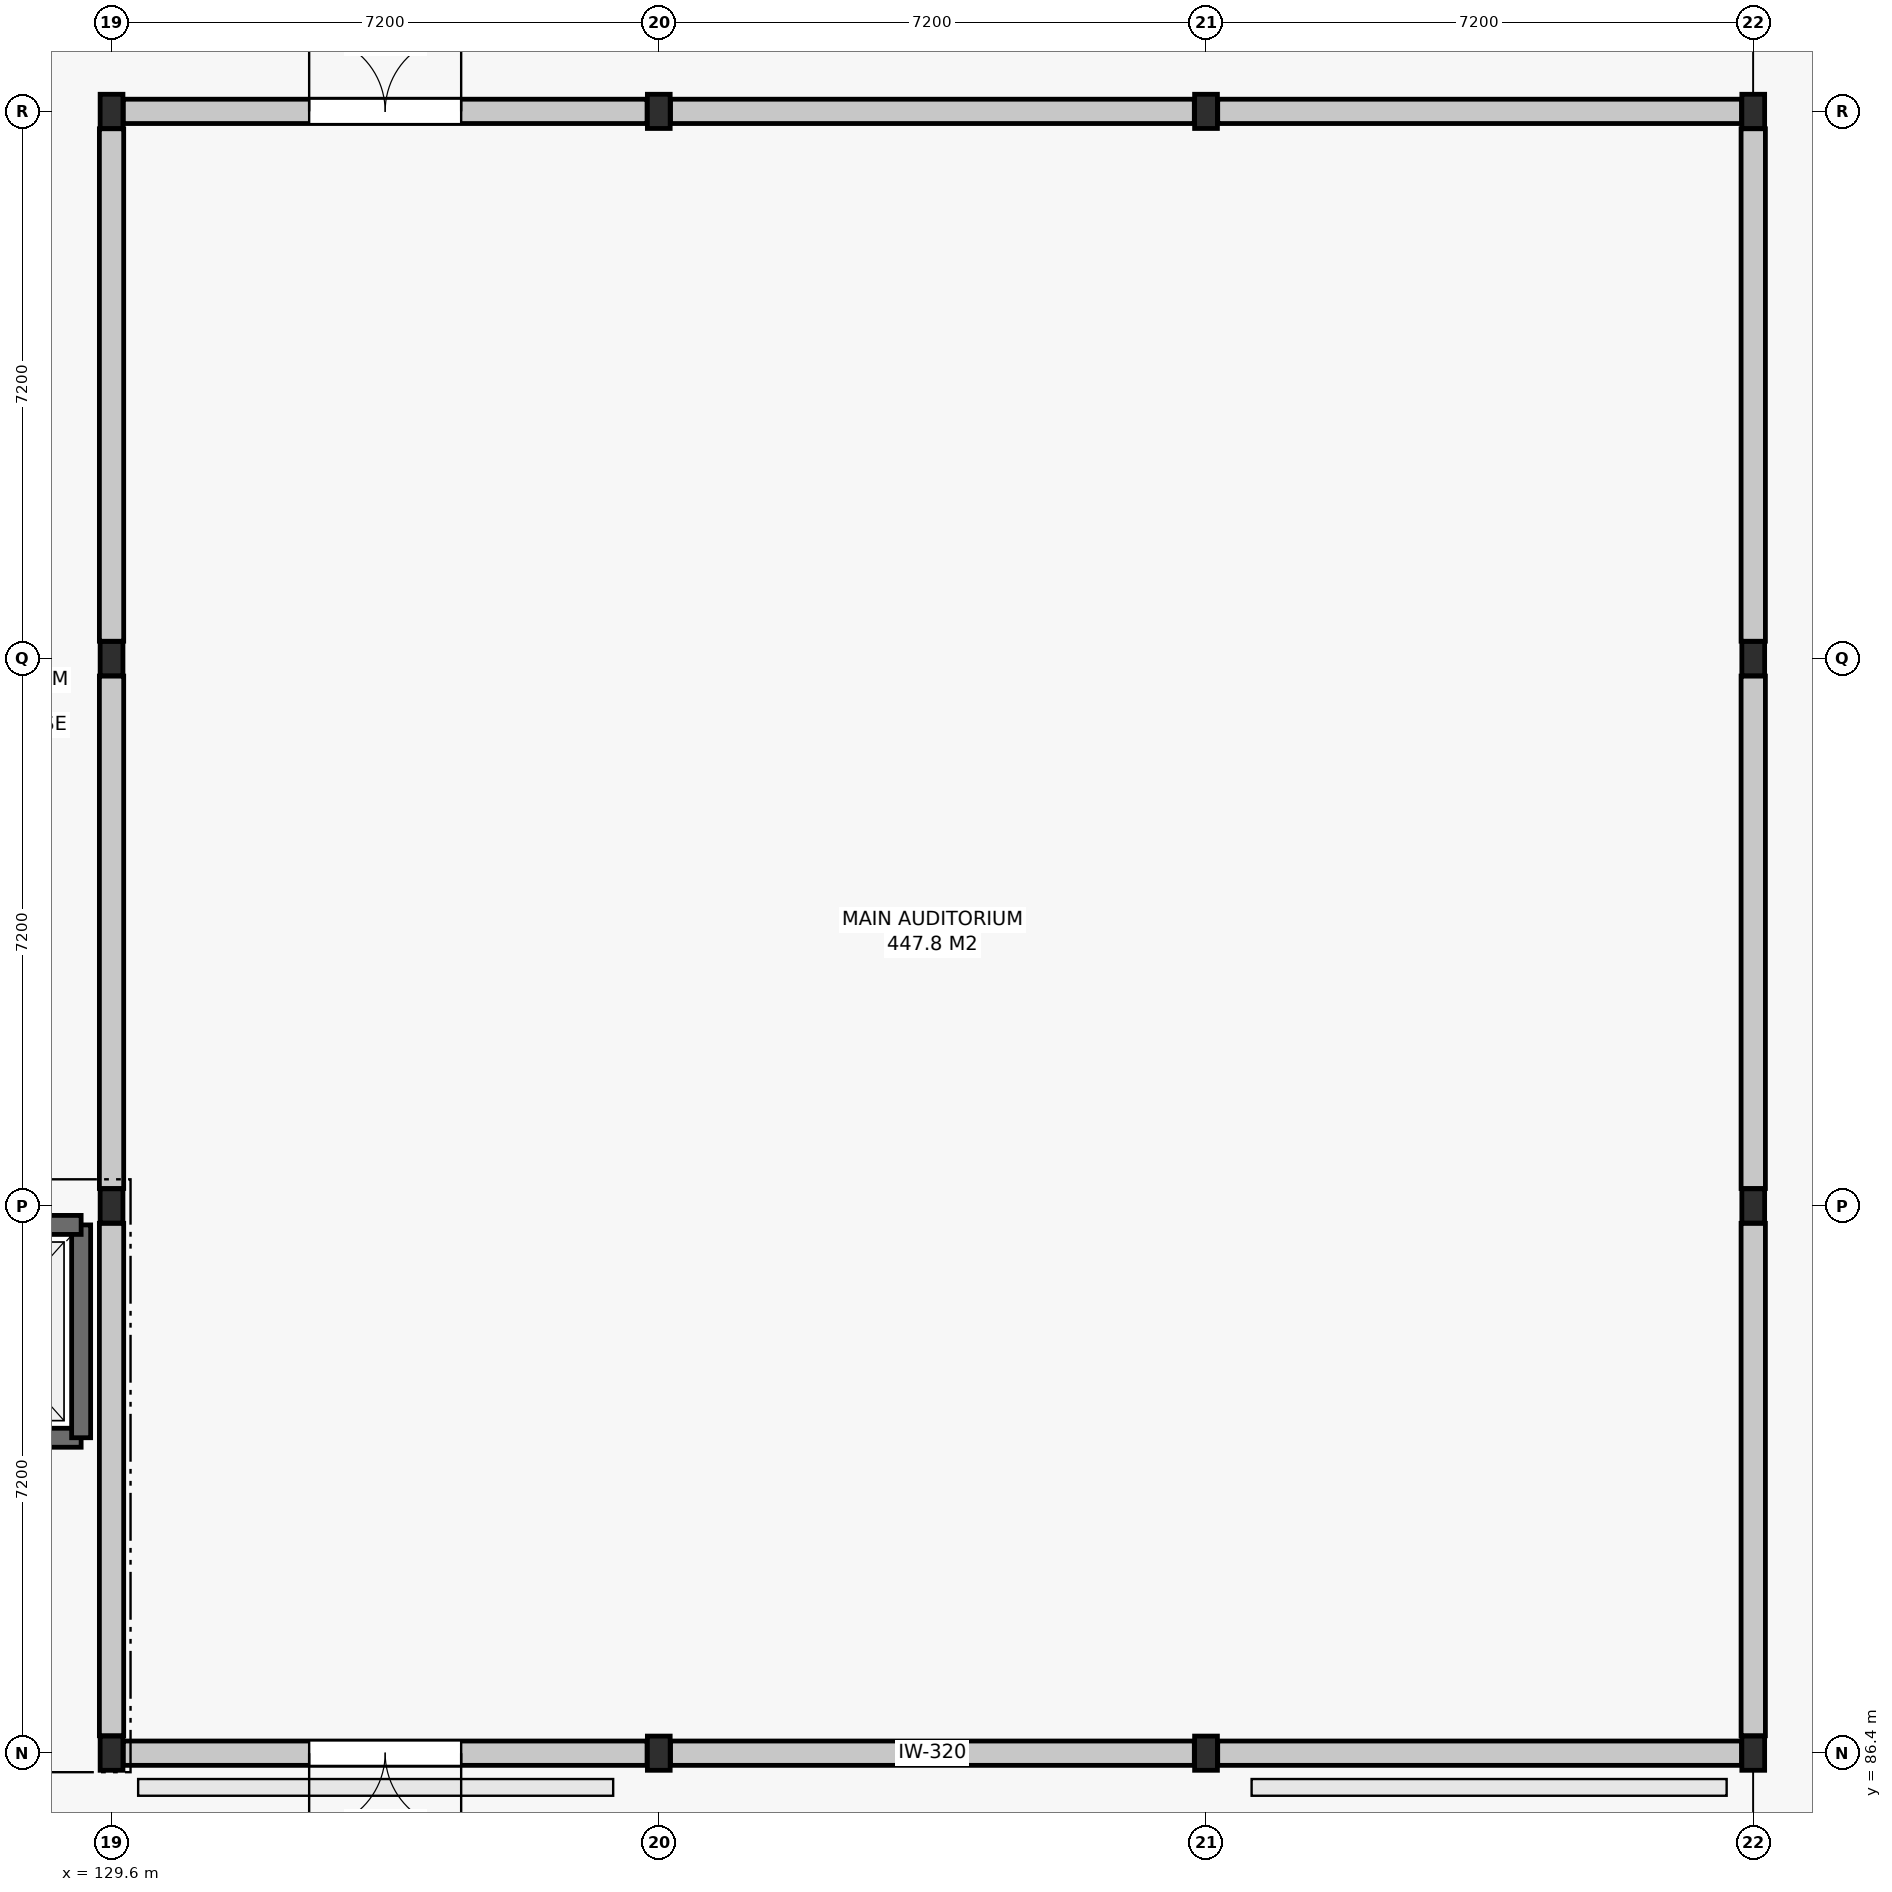
"""IFC4 building model, lengths in metres.
Left out: names, types, materials, properties, quantities, classifications, styles, units other than length and angle.
Written with IfcOpenShell. Run it as: python <this file> out.ifc"""

import sys

from ifc_helpers import new_model, si_unit, direction, frame, frame_2d, origin, origin_2d, place, context, subcontext, project, spatial, rectangle, i_section, extrude, element, fill, save


model = new_model("IFC4")
c1 = context("Model", 3, precision=1e-05, world=origin(), true_north=direction((0.0, 1.0)))
c2 = subcontext(c1, "Body", "Model", "MODEL_VIEW")
j1 = project(units=[si_unit("LENGTHUNIT", "METRE"), si_unit("PLANEANGLEUNIT", "RADIAN")], contexts=[c1])
p1 = place(None, origin())
s1 = spatial("IfcSite", under=j1, at=p1, CompositionType="ELEMENT")
p2 = place(p1, origin())
s2 = spatial("IfcBuilding", under=s1, at=p2, CompositionType="ELEMENT")
p3 = place(p2, origin())
s3 = spatial("IfcBuildingStorey", under=s2, at=p3, CompositionType="ELEMENT", Elevation=0.0)
for number, where, z_axis, x_axis in (
    (1, (129.6, 86.4, 0.0), (0.0, 0.0, 1.0), (1.0, 0.0, 0.0)),
    (2, (129.6, 93.6, 0.0), (0.0, 0.0, 1.0), (1.0, 0.0, 0.0)),
    (3, (129.6, 100.8, 0.0), (0.0, 0.0, 1.0), (1.0, 0.0, 0.0)),
    (4, (129.6, 108.0, 0.0), (0.0, 0.0, 1.0), (1.0, 0.0, 0.0)),
    (5, (136.8, 86.4, 0.0), (0.0, 0.0, 1.0), (1.0, 0.0, 0.0)),
    (6, (136.8, 108.0, 0.0), (0.0, 0.0, 1.0), (1.0, 0.0, 0.0)),
    (7, (144.0, 86.4, 0.0), (0.0, 0.0, 1.0), (1.0, 0.0, 0.0)),
    (8, (144.0, 108.0, 0.0), (0.0, 0.0, 1.0), (1.0, 0.0, 0.0)),
    (9, (151.2, 86.4, 0.0), (0.0, 0.0, 1.0), (1.0, 0.0, 0.0)),
    (10, (151.2, 93.6, 0.0), (0.0, 0.0, 1.0), (1.0, 0.0, 0.0)),
    (11, (151.2, 100.8, 0.0), (0.0, 0.0, 1.0), (1.0, 0.0, 0.0)),
    (12, (151.2, 108.0, 0.0), (0.0, 0.0, 1.0), (1.0, 0.0, 0.0)),
):
    element("IfcColumn", number, at=place(p3, frame(where, z_axis=z_axis, x_axis=x_axis)), inside=s3, PredefinedType="COLUMN", context=c2, shape_type="SweptSolid", body=[
        extrude(i_section(OverallWidth=0.3, OverallDepth=0.45, WebThickness=0.014, FlangeThickness=0.026, FilletRadius=0.027, at=origin_2d()), origin(), (0.0, 0.0, 1.0), 5.4),
    ])
p4 = place(p3, frame((126.65, 90.55, 0.0), z_axis=(0.0, 0.0, 1.0), x_axis=(1.0, 0.0, 0.0)))
e13 = element("IfcWall", 13, at=p4, inside=s3, PredefinedType="SHEAR", context=c2, shape_type="SweptSolid", body=[
    extrude(rectangle(XDim=2.55, YDim=0.25, at=frame_2d((1.275, 0.0))), origin(), (0.0, 0.0, 1.0), 5.12),
])
p5 = place(p4, frame((0.725, 0.0, 0.0)))
e14 = element("IfcOpeningElement", 14, at=p5, cuts=e13, PredefinedType="OPENING", context=c2, shape_type="SweptSolid", body=[
    extrude(rectangle(XDim=1.1, YDim=2.1, at=frame_2d((0.55, 1.05))), frame((0.0, 0.137, 0.0), z_axis=(0.0, -1.0, 0.0), x_axis=(1.0, 0.0, 0.0)), (0.0, 0.0, 1.0), 0.274),
])
p6 = place(p3, frame((129.2, 90.55, 0.0), z_axis=(0.0, 0.0, 1.0), x_axis=(0.0, 1.0, 0.0)))
e15 = element("IfcWall", 15, at=p6, inside=s3, PredefinedType="SHEAR", context=c2, shape_type="SweptSolid", body=[
    extrude(rectangle(XDim=2.8, YDim=0.25, at=frame_2d((1.4, 0.0))), origin(), (0.0, 0.0, 1.0), 5.12),
])
p7 = place(p3, frame((129.2, 93.35, 0.0), z_axis=(0.0, 0.0, 1.0), x_axis=(-1.0, 0.0, 0.0)))
e16 = element("IfcWall", 16, at=p7, inside=s3, PredefinedType="SHEAR", context=c2, shape_type="SweptSolid", body=[
    extrude(rectangle(XDim=2.55, YDim=0.25, at=frame_2d((1.275, 0.0))), origin(), (0.0, 0.0, 1.0), 5.12),
])
p8 = place(p3, frame((129.754, 86.4, 0.0), z_axis=(0.0, 0.0, 1.0), x_axis=(1.0, 0.0, 0.0)))
e17 = element("IfcWall", 17, at=p8, inside=s3, PredefinedType="SOLIDWALL", context=c2, shape_type="SweptSolid", body=[
    extrude(rectangle(XDim=6.892, YDim=0.32, at=frame_2d((3.446, 0.0))), origin(), (0.0, 0.0, 1.0), 5.105),
])
p9 = place(p8, frame((2.446, 0.0, 0.0)))
e18 = element("IfcOpeningElement", 18, at=p9, cuts=e17, PredefinedType="OPENING", context=c2, shape_type="SweptSolid", body=[
    extrude(rectangle(XDim=2.0, YDim=2.4, at=frame_2d((1.0, 1.2))), frame((0.0, 0.172, 0.0), z_axis=(0.0, -1.0, 0.0), x_axis=(1.0, 0.0, 0.0)), (0.0, 0.0, 1.0), 0.344),
])
for number, where, z_axis, x_axis in (
    (19, (136.954, 86.4, 0.0), (0.0, 0.0, 1.0), (1.0, 0.0, 0.0)),
    (20, (144.154, 86.4, 0.0), (0.0, 0.0, 1.0), (1.0, 0.0, 0.0)),
):
    element("IfcWall", number, at=place(p3, frame(where, z_axis=z_axis, x_axis=x_axis)), inside=s3, PredefinedType="SOLIDWALL", context=c2, shape_type="SweptSolid", body=[
        extrude(rectangle(XDim=6.892, YDim=0.32, at=frame_2d((3.446, 0.0))), origin(), (0.0, 0.0, 1.0), 5.105),
    ])
p10 = place(p3, frame((129.754, 108.0, 0.0), z_axis=(0.0, 0.0, 1.0), x_axis=(1.0, 0.0, 0.0)))
e21 = element("IfcWall", 21, at=p10, inside=s3, PredefinedType="SOLIDWALL", context=c2, shape_type="SweptSolid", body=[
    extrude(rectangle(XDim=6.892, YDim=0.32, at=frame_2d((3.446, 0.0))), origin(), (0.0, 0.0, 1.0), 5.105),
])
p11 = place(p10, frame((2.446, 0.0, 0.0)))
e22 = element("IfcOpeningElement", 22, at=p11, cuts=e21, PredefinedType="OPENING", context=c2, shape_type="SweptSolid", body=[
    extrude(rectangle(XDim=2.0, YDim=2.4, at=frame_2d((1.0, 1.2))), frame((0.0, 0.172, 0.0), z_axis=(0.0, -1.0, 0.0), x_axis=(1.0, 0.0, 0.0)), (0.0, 0.0, 1.0), 0.344),
])
for number, where, z_axis, x_axis in (
    (23, (136.954, 108.0, 0.0), (0.0, 0.0, 1.0), (1.0, 0.0, 0.0)),
    (24, (144.154, 108.0, 0.0), (0.0, 0.0, 1.0), (1.0, 0.0, 0.0)),
):
    element("IfcWall", number, at=place(p3, frame(where, z_axis=z_axis, x_axis=x_axis)), inside=s3, PredefinedType="SOLIDWALL", context=c2, shape_type="SweptSolid", body=[
        extrude(rectangle(XDim=6.892, YDim=0.32, at=frame_2d((3.446, 0.0))), origin(), (0.0, 0.0, 1.0), 5.105),
    ])
p12 = place(p3, frame((129.6, 86.629, 0.0), z_axis=(0.0, 0.0, 1.0), x_axis=(0.0, 1.0, 0.0)))
e25 = element("IfcWall", 25, at=p12, inside=s3, PredefinedType="SOLIDWALL", context=c2, shape_type="SweptSolid", body=[
    extrude(rectangle(XDim=6.742, YDim=0.32, at=frame_2d((3.371, 0.0))), origin(), (0.0, 0.0, 1.0), 5.105),
])
for number, where, z_axis, x_axis in (
    (26, (129.6, 93.829, 0.0), (0.0, 0.0, 1.0), (0.0, 1.0, 0.0)),
    (27, (129.6, 101.029, 0.0), (0.0, 0.0, 1.0), (0.0, 1.0, 0.0)),
):
    element("IfcWall", number, at=place(p3, frame(where, z_axis=z_axis, x_axis=x_axis)), inside=s3, PredefinedType="SOLIDWALL", context=c2, shape_type="SweptSolid", body=[
        extrude(rectangle(XDim=6.742, YDim=0.32, at=frame_2d((3.371, 0.0))), origin(), (0.0, 0.0, 1.0), 5.105),
    ])
p13 = place(p3, frame((151.2, 86.629, 0.0), z_axis=(0.0, 0.0, 1.0), x_axis=(0.0, 1.0, 0.0)))
e28 = element("IfcWall", 28, at=p13, inside=s3, PredefinedType="SOLIDWALL", context=c2, shape_type="SweptSolid", body=[
    extrude(rectangle(XDim=6.742, YDim=0.32, at=frame_2d((3.371, 0.0))), origin(), (0.0, 0.0, 1.0), 5.105),
])
for number, where, z_axis, x_axis in (
    (29, (151.2, 93.829, 0.0), (0.0, 0.0, 1.0), (0.0, 1.0, 0.0)),
    (30, (151.2, 101.029, 0.0), (0.0, 0.0, 1.0), (0.0, 1.0, 0.0)),
):
    element("IfcWall", number, at=place(p3, frame(where, z_axis=z_axis, x_axis=x_axis)), inside=s3, PredefinedType="SOLIDWALL", context=c2, shape_type="SweptSolid", body=[
        extrude(rectangle(XDim=6.742, YDim=0.32, at=frame_2d((3.371, 0.0))), origin(), (0.0, 0.0, 1.0), 5.105),
    ])
p14 = place(p9, frame((2.0, 0.0, 0.0), z_axis=(0.0, 0.0, 1.0), x_axis=(-1.0, 0.0, 0.0)))
e31 = element("IfcDoor", 31, at=p14, inside=s3, OperationType="DOUBLE_DOOR_SINGLE_SWING", PredefinedType="DOOR", context=c2, shape_type="SweptSolid", body=[
    extrude(rectangle(XDim=2.0, YDim=2.4, at=frame_2d((1.0, 1.2))), frame((0.0, 0.025, 0.0), z_axis=(0.0, -1.0, 0.0), x_axis=(1.0, 0.0, 0.0)), (0.0, 0.0, 1.0), 0.05),
])
fill(e18, e31)
p15 = place(p11, origin())
e32 = element("IfcDoor", 32, at=p15, inside=s3, OperationType="DOUBLE_DOOR_SINGLE_SWING", PredefinedType="DOOR", context=c2, shape_type="SweptSolid", body=[
    extrude(rectangle(XDim=2.0, YDim=2.4, at=frame_2d((1.0, 1.2))), frame((0.0, 0.025, 0.0), z_axis=(0.0, -1.0, 0.0), x_axis=(1.0, 0.0, 0.0)), (0.0, 0.0, 1.0), 0.05),
])
fill(e22, e32)
save(model, sys.argv[1])
